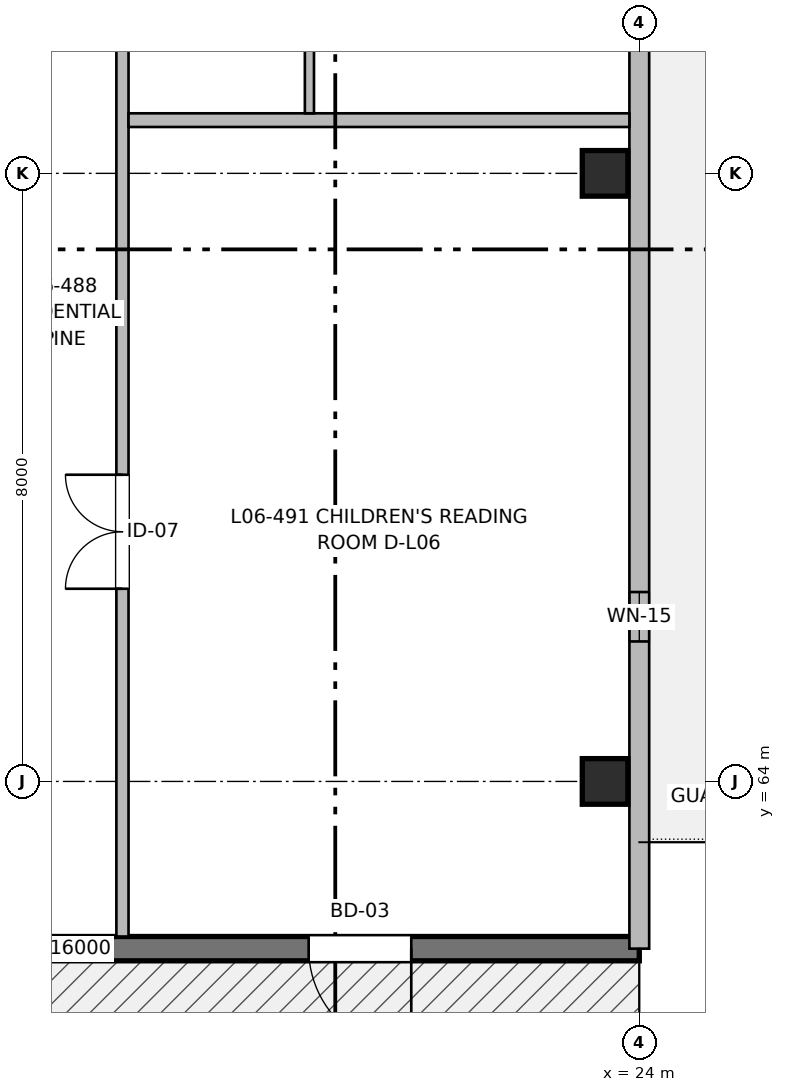
"""IFC4 building model, lengths in metres.
Left out: names, types, materials, properties, quantities, classifications, styles, units other than length and angle.
Written with IfcOpenShell. Run it as: python <this file> out.ifc"""

import sys

from ifc_helpers import new_model, si_unit, direction, frame, frame_2d, origin, origin_2d, place, context, subcontext, project, spatial, rectangle, extrude, element, fill, save


model = new_model("IFC4")
c1 = context("Model", 3, precision=1e-05, world=origin(), true_north=direction((0.0, 1.0)))
c2 = subcontext(c1, "Body", "Model", "MODEL_VIEW")
j1 = project(units=[si_unit("LENGTHUNIT", "METRE"), si_unit("PLANEANGLEUNIT", "RADIAN")], contexts=[c1])
p1 = place(None, origin())
s1 = spatial("IfcSite", under=j1, at=p1, CompositionType="ELEMENT")
p2 = place(p1, origin())
s2 = spatial("IfcBuilding", under=s1, at=p2, CompositionType="ELEMENT")
p3 = place(p2, frame((0.0, 0.0, 20.16)))
s3 = spatial("IfcBuildingStorey", under=s2, at=p3, CompositionType="ELEMENT", Elevation=20.16)
for number, where, z_axis, x_axis in (
    (1, (23.55, 64.0, 0.0), (0.0, 0.0, 1.0), (1.0, 0.0, 0.0)),
    (2, (23.55, 72.0, 0.0), (0.0, 0.0, 1.0), (1.0, 0.0, 0.0)),
):
    element("IfcColumn", number, at=place(p3, frame(where, z_axis=z_axis, x_axis=x_axis)), inside=s3, PredefinedType="COLUMN", context=c2, shape_type="SweptSolid", body=[
        extrude(rectangle(XDim=0.6, YDim=0.6, at=origin_2d()), origin(), (0.0, 0.0, 1.0), 3.2),
    ])
p4 = place(p3, frame((24.0, 61.8, 0.0), z_axis=(0.0, 0.0, 1.0), x_axis=(-1.0, 0.0, 0.0)))
e3 = element("IfcWall", 3, at=p4, inside=s3, PredefinedType="SHEAR", context=c2, shape_type="SweptSolid", body=[
    extrude(rectangle(XDim=16.0, YDim=0.32, at=frame_2d((8.0, 0.0))), origin(), (0.0, 0.0, 1.0), 2.98),
])
p5 = place(p4, frame((3.0, 0.0, 0.0)))
e4 = element("IfcOpeningElement", 4, at=p5, cuts=e3, PredefinedType="OPENING", context=c2, shape_type="SweptSolid", body=[
    extrude(rectangle(XDim=1.35, YDim=2.2, at=frame_2d((0.675, 1.1))), frame((0.0, 0.17, 0.0), z_axis=(0.0, -1.0, 0.0), x_axis=(1.0, 0.0, 0.0)), (0.0, 0.0, 1.0), 0.34),
])
p6 = place(p4, frame((11.4, 0.0, 0.9)))
e5 = element("IfcOpeningElement", 5, at=p6, cuts=e3, PredefinedType="OPENING", context=c2, shape_type="SweptSolid", body=[
    extrude(rectangle(XDim=1.2, YDim=1.05, at=frame_2d((0.6, 0.525))), frame((0.0, 0.17, 0.0), z_axis=(0.0, -1.0, 0.0), x_axis=(1.0, 0.0, 0.0)), (0.0, 0.0, 1.0), 0.34),
])
p7 = place(p3, frame((24.0, 88.0, 0.0), z_axis=(0.0, 0.0, 1.0), x_axis=(0.0, -1.0, 0.0)))
e6 = element("IfcWall", 6, at=p7, inside=s3, PredefinedType="SOLIDWALL", context=c2, shape_type="SweptSolid", body=[
    extrude(rectangle(XDim=26.2, YDim=0.26, at=frame_2d((13.1, 0.0))), origin(), (0.0, 0.0, 1.0), 2.98),
])
p8 = place(p7, frame((3.767, 0.0, 0.0)))
e7 = element("IfcOpeningElement", 7, at=p8, cuts=e6, PredefinedType="OPENING", context=c2, shape_type="SweptSolid", body=[
    extrude(rectangle(XDim=1.2, YDim=2.2, at=frame_2d((0.6, 1.1))), frame((0.0, 0.14, 0.0), z_axis=(0.0, -1.0, 0.0), x_axis=(1.0, 0.0, 0.0)), (0.0, 0.0, 1.0), 0.28),
])
p9 = place(p7, frame((8.667, 0.0, 0.57)))
e8 = element("IfcOpeningElement", 8, at=p9, cuts=e6, PredefinedType="OPENING", context=c2, shape_type="SweptSolid", body=[
    extrude(rectangle(XDim=2.3, YDim=1.65, at=frame_2d((1.15, 0.825))), frame((0.0, 0.14, 0.0), z_axis=(0.0, -1.0, 0.0), x_axis=(1.0, 0.0, 0.0)), (0.0, 0.0, 1.0), 0.28),
])
p10 = place(p7, frame((12.5, 0.0, 0.9)))
e9 = element("IfcOpeningElement", 9, at=p10, cuts=e6, PredefinedType="OPENING", context=c2, shape_type="SweptSolid", body=[
    extrude(rectangle(XDim=1.2, YDim=1.05, at=frame_2d((0.6, 0.525))), frame((0.0, 0.14, 0.0), z_axis=(0.0, -1.0, 0.0), x_axis=(1.0, 0.0, 0.0)), (0.0, 0.0, 1.0), 0.28),
])
p11 = place(p7, frame((21.508, 0.0, 0.9)))
e10 = element("IfcOpeningElement", 10, at=p11, cuts=e6, PredefinedType="OPENING", context=c2, shape_type="SweptSolid", body=[
    extrude(rectangle(XDim=0.65, YDim=0.95, at=frame_2d((0.325, 0.475))), frame((0.0, 0.14, 0.0), z_axis=(0.0, -1.0, 0.0), x_axis=(1.0, 0.0, 0.0)), (0.0, 0.0, 1.0), 0.28),
])
p12 = place(p7, frame((0.675, 0.0, 0.82)))
e11 = element("IfcOpeningElement", 11, at=p12, cuts=e6, PredefinedType="OPENING", context=c2, shape_type="SweptSolid", body=[
    extrude(rectangle(XDim=1.5, YDim=1.4, at=frame_2d((0.75, 0.7))), frame((0.0, 0.14, 0.0), z_axis=(0.0, -1.0, 0.0), x_axis=(1.0, 0.0, 0.0)), (0.0, 0.0, 1.0), 0.28),
])
p13 = place(p3, frame((17.2, 61.96, 0.0), z_axis=(0.0, 0.0, 1.0), x_axis=(0.0, 1.0, 0.0)))
e12 = element("IfcWall", 12, at=p13, inside=s3, PredefinedType="PARTITIONING", context=c2, shape_type="SweptSolid", body=[
    extrude(rectangle(XDim=44.84, YDim=0.16, at=frame_2d((22.42, 0.0))), origin(), (0.0, 0.0, 1.0), 2.935),
])
p14 = place(p13, frame((4.575, 0.0, 0.0)))
e13 = element("IfcOpeningElement", 13, at=p14, cuts=e12, PredefinedType="OPENING", context=c2, shape_type="SweptSolid", body=[
    extrude(rectangle(XDim=1.5, YDim=2.2, at=frame_2d((0.75, 1.1))), frame((0.0, 0.09, 0.0), z_axis=(0.0, -1.0, 0.0), x_axis=(1.0, 0.0, 0.0)), (0.0, 0.0, 1.0), 0.18),
])
p15 = place(p13, frame((17.27, 0.0, 0.0)))
e14 = element("IfcOpeningElement", 14, at=p15, cuts=e12, PredefinedType="OPENING", context=c2, shape_type="SweptSolid", body=[
    extrude(rectangle(XDim=0.98, YDim=2.15, at=frame_2d((0.49, 1.075))), frame((0.0, 0.09, 0.0), z_axis=(0.0, -1.0, 0.0), x_axis=(1.0, 0.0, 0.0)), (0.0, 0.0, 1.0), 0.18),
])
p16 = place(p13, frame((29.39, 0.0, 0.0)))
e15 = element("IfcOpeningElement", 15, at=p16, cuts=e12, PredefinedType="OPENING", context=c2, shape_type="SweptSolid", body=[
    extrude(rectangle(XDim=0.98, YDim=2.15, at=frame_2d((0.49, 1.075))), frame((0.0, 0.09, 0.0), z_axis=(0.0, -1.0, 0.0), x_axis=(1.0, 0.0, 0.0)), (0.0, 0.0, 1.0), 0.18),
])
p17 = place(p13, frame((40.24, 0.0, 0.0)))
e16 = element("IfcOpeningElement", 16, at=p17, cuts=e12, PredefinedType="OPENING", context=c2, shape_type="SweptSolid", body=[
    extrude(rectangle(XDim=0.98, YDim=2.15, at=frame_2d((0.49, 1.075))), frame((0.0, 0.09, 0.0), z_axis=(0.0, -1.0, 0.0), x_axis=(1.0, 0.0, 0.0)), (0.0, 0.0, 1.0), 0.18),
])
p18 = place(p3, frame((17.28, 72.7, 0.0), z_axis=(0.0, 0.0, 1.0), x_axis=(1.0, 0.0, 0.0)))
e17 = element("IfcWall", 17, at=p18, inside=s3, PredefinedType="PARTITIONING", context=c2, shape_type="SweptSolid", body=[
    extrude(rectangle(XDim=6.59, YDim=0.18, at=frame_2d((3.295, 0.0))), origin(), (0.0, 0.0, 1.0), 2.935),
])
p19 = place(p3, frame((19.66, 72.79, 0.0), z_axis=(0.0, 0.0, 1.0), x_axis=(0.0, 1.0, 0.0)))
e18 = element("IfcWall", 18, at=p19, inside=s3, PredefinedType="PARTITIONING", context=c2, shape_type="SweptSolid", body=[
    extrude(rectangle(XDim=12.36, YDim=0.12, at=frame_2d((6.18, 0.0))), origin(), (0.0, 0.0, 1.0), 2.935),
])
p20 = place(p19, frame((2.162, 0.0, 0.0)))
e19 = element("IfcOpeningElement", 19, at=p20, cuts=e18, PredefinedType="OPENING", context=c2, shape_type="SweptSolid", body=[
    extrude(rectangle(XDim=0.86, YDim=2.1, at=frame_2d((0.43, 1.05))), frame((0.0, 0.07, 0.0), z_axis=(0.0, -1.0, 0.0), x_axis=(1.0, 0.0, 0.0)), (0.0, 0.0, 1.0), 0.14),
])
p21 = place(p19, frame((7.558, 0.0, 0.0)))
e20 = element("IfcOpeningElement", 20, at=p21, cuts=e18, PredefinedType="OPENING", context=c2, shape_type="SweptSolid", body=[
    extrude(rectangle(XDim=0.92, YDim=2.1, at=frame_2d((0.46, 1.05))), frame((0.0, 0.07, 0.0), z_axis=(0.0, -1.0, 0.0), x_axis=(1.0, 0.0, 0.0)), (0.0, 0.0, 1.0), 0.14),
])
p22 = place(p5, origin())
e21 = element("IfcDoor", 21, at=p22, inside=s3, OperationType="SINGLE_SWING_LEFT", PredefinedType="DOOR", context=c2, shape_type="SweptSolid", body=[
    extrude(rectangle(XDim=1.35, YDim=2.2, at=frame_2d((0.675, 1.1))), frame((0.0, 0.025, 0.0), z_axis=(0.0, -1.0, 0.0), x_axis=(1.0, 0.0, 0.0)), (0.0, 0.0, 1.0), 0.05),
])
fill(e4, e21)
p23 = place(p11, origin())
e22 = element("IfcWindow", 22, at=p23, inside=s3, PartitioningType="SINGLE_PANEL", PredefinedType="WINDOW", context=c2, shape_type="SweptSolid", body=[
    extrude(rectangle(XDim=0.65, YDim=0.95, at=frame_2d((0.325, 0.475))), frame((0.0, 0.03, 0.0), z_axis=(0.0, -1.0, 0.0), x_axis=(1.0, 0.0, 0.0)), (0.0, 0.0, 1.0), 0.06),
])
fill(e10, e22)
p24 = place(p14, origin())
e23 = element("IfcDoor", 23, at=p24, inside=s3, OperationType="DOUBLE_DOOR_SINGLE_SWING", PredefinedType="DOOR", context=c2, shape_type="SweptSolid", body=[
    extrude(rectangle(XDim=1.5, YDim=2.2, at=frame_2d((0.75, 1.1))), frame((0.0, 0.025, 0.0), z_axis=(0.0, -1.0, 0.0), x_axis=(1.0, 0.0, 0.0)), (0.0, 0.0, 1.0), 0.05),
])
fill(e13, e23)
save(model, sys.argv[1])
